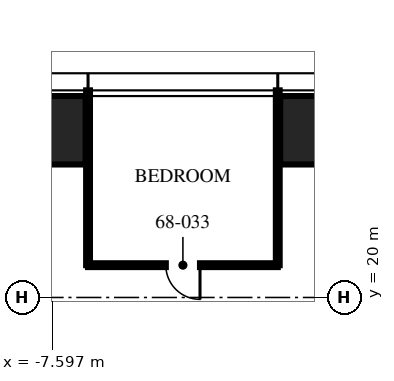
"""IFC4 building model, lengths in metres.
Left out: names, types, materials, properties, quantities, classifications, styles, units other than length and angle.
Written with IfcOpenShell. Run it as: python <this file> out.ifc"""

import sys

from ifc_helpers import new_model, si_unit, direction, frame, frame_2d, origin, origin_2d, place, context, subcontext, project, spatial, rectangle, hollow_rectangle, extrude, element, fill, save


model = new_model("IFC4")
c1 = context("Model", 3, precision=1e-05, world=origin(), true_north=direction((0.0, 1.0)))
c2 = subcontext(c1, "Body", "Model", "MODEL_VIEW")
j1 = project(units=[si_unit("LENGTHUNIT", "METRE"), si_unit("PLANEANGLEUNIT", "RADIAN")], contexts=[c1])
p1 = place(None, origin())
s1 = spatial("IfcSite", under=j1, at=p1, CompositionType="ELEMENT")
p2 = place(p1, origin())
s2 = spatial("IfcBuilding", under=s1, at=p2, CompositionType="ELEMENT")
p3 = place(p2, frame((0.0, 0.0, 270.75)))
s3 = spatial("IfcBuildingStorey", under=s2, at=p3, CompositionType="ELEMENT", Elevation=270.75)
for number, where, z_axis, x_axis in (
    (1, (-8.32, 24.4, 0.0), (0.0, 0.0, 1.0), (1.0, 0.0, 0.0)),
    (2, (0.0, 24.4, 0.0), (0.0, 0.0, 1.0), (1.0, 0.0, 0.0)),
):
    element("IfcColumn", number, at=place(p3, frame(where, z_axis=z_axis, x_axis=x_axis)), inside=s3, PredefinedType="COLUMN", context=c2, shape_type="SweptSolid", body=[
        extrude(hollow_rectangle(XDim=3.2, YDim=1.8, WallThickness=0.14, at=origin_2d()), origin(), (0.0, 0.0, 1.0), 3.75),
    ])
for number, where, z_axis, x_axis in (
    (3, (-1.664, 20.85, 0.0), (0.0, 0.0, 1.0), (0.0, 1.0, 0.0)),
    (4, (-6.656, 20.85, 0.0), (0.0, 0.0, 1.0), (0.0, 1.0, 0.0)),
):
    element("IfcWall", number, at=place(p3, frame(where, z_axis=z_axis, x_axis=x_axis)), inside=s3, PredefinedType="PARTITIONING", context=c2, shape_type="SweptSolid", body=[
        extrude(rectangle(XDim=4.6, YDim=0.1, at=frame_2d((2.3, 0.0))), origin(), (0.0, 0.0, 1.0), 2.81),
    ])
p4 = place(p3, frame((-1.664, 20.85, 0.0), z_axis=(0.0, 0.0, 1.0), x_axis=(-1.0, 0.0, 0.0)))
e5 = element("IfcWall", 5, at=p4, inside=s3, PredefinedType="PARTITIONING", context=c2, shape_type="SweptSolid", body=[
    extrude(rectangle(XDim=4.992, YDim=0.1, at=frame_2d((2.496, 0.0))), origin(), (0.0, 0.0, 1.0), 2.71),
])
p5 = place(p4, frame((2.046, 0.0, 0.0)))
e6 = element("IfcOpeningElement", 6, at=p5, cuts=e5, PredefinedType="OPENING", context=c2, shape_type="SweptSolid", body=[
    extrude(rectangle(XDim=0.9, YDim=2.1, at=frame_2d((0.45, 1.05))), frame((0.0, 0.06, 0.0), z_axis=(0.0, -1.0, 0.0), x_axis=(1.0, 0.0, 0.0)), (0.0, 0.0, 1.0), 0.12),
])
p6 = place(p5, origin())
e7 = element("IfcDoor", 7, at=p6, inside=s3, OperationType="SINGLE_SWING_LEFT", PredefinedType="DOOR", context=c2, shape_type="SweptSolid", body=[
    extrude(rectangle(XDim=0.9, YDim=2.1, at=frame_2d((0.45, 1.05))), frame((0.0, 0.025, 0.0), z_axis=(0.0, -1.0, 0.0), x_axis=(1.0, 0.0, 0.0)), (0.0, 0.0, 1.0), 0.05),
])
fill(e6, e7)
save(model, sys.argv[1])
